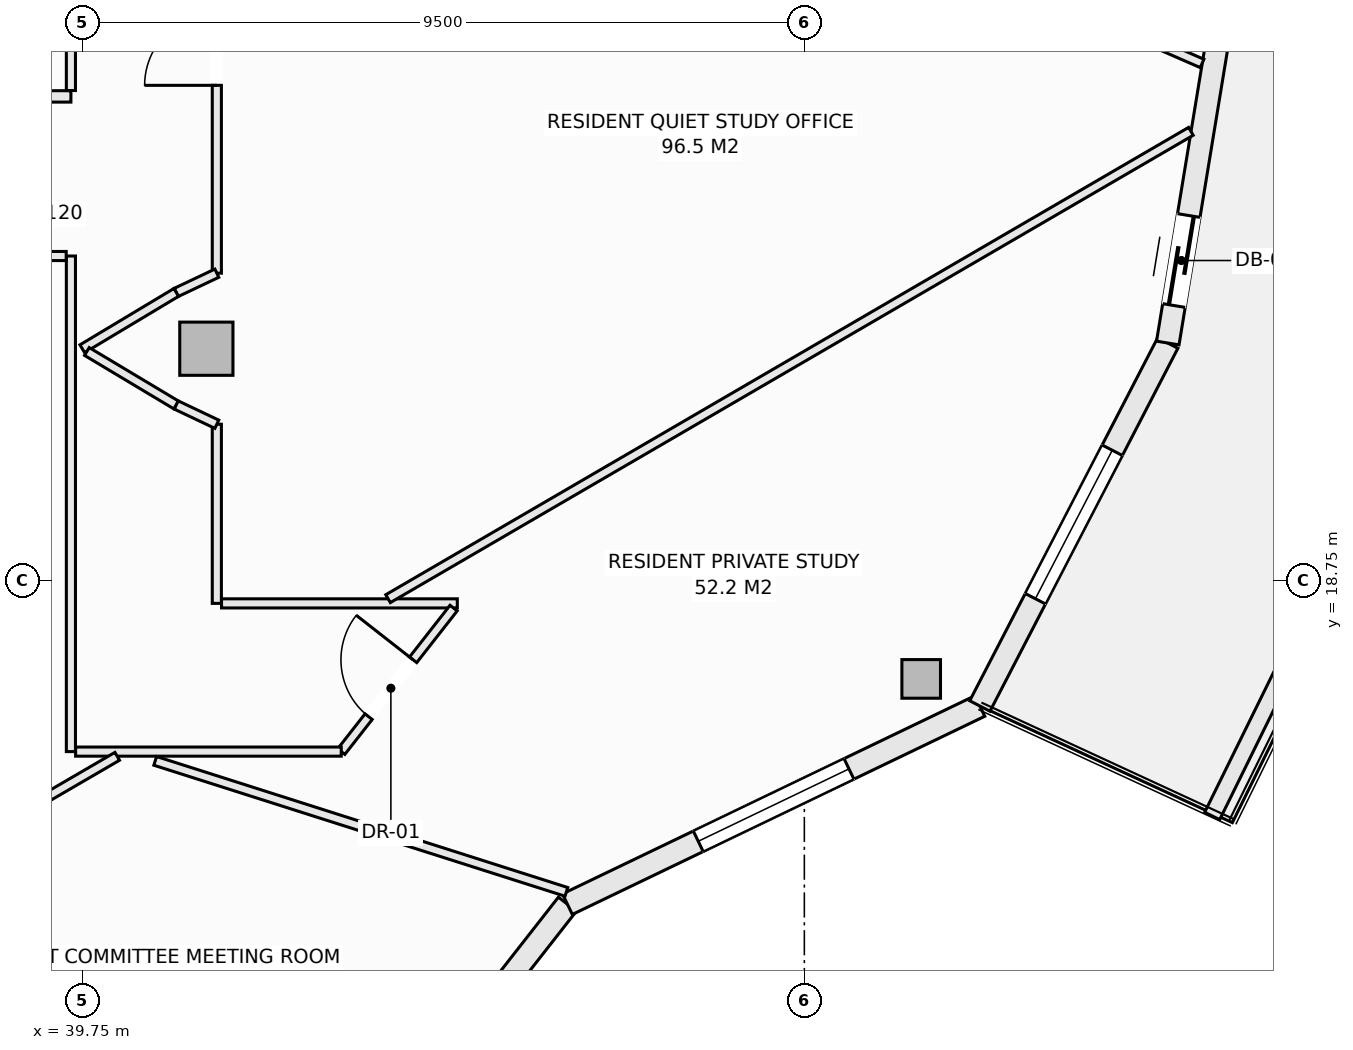
"""IFC4 building model, lengths in metres.
Left out: names, types, materials, properties, quantities, classifications, styles, units other than length and angle.
Written with IfcOpenShell. Run it as: python <this file> out.ifc"""

import sys

from ifc_helpers import new_model, si_unit, direction, frame, frame_2d, origin, origin_2d, place, context, subcontext, project, spatial, rectangle, hollow_rectangle, extrude, element, fill, save


model = new_model("IFC4")
c1 = context("Model", 3, precision=1e-05, world=origin(), true_north=direction((0.0, 1.0)))
c2 = subcontext(c1, "Body", "Model", "MODEL_VIEW")
j1 = project(units=[si_unit("LENGTHUNIT", "METRE"), si_unit("PLANEANGLEUNIT", "RADIAN")], contexts=[c1])
p1 = place(None, origin())
s1 = spatial("IfcSite", under=j1, at=p1, CompositionType="ELEMENT")
p2 = place(p1, origin())
s2 = spatial("IfcBuilding", under=s1, at=p2, CompositionType="ELEMENT")
p3 = place(p2, frame((0.0, 0.0, 229.4)))
s3 = spatial("IfcBuildingStorey", under=s2, at=p3, CompositionType="ELEMENT", Elevation=229.4)
p4 = place(p3, frame((50.787, 17.456, -0.27), z_axis=(0.0, 0.0, 1.0), x_axis=(1.0, 0.0, 0.0)))
e1 = element("IfcColumn", 1, at=p4, inside=s3, PredefinedType="COLUMN", context=c2, shape_type="SweptSolid", body=[
    extrude(hollow_rectangle(XDim=0.508, YDim=0.508, WallThickness=0.019, at=origin_2d()), origin(), (0.0, 0.0, 1.0), 3.3),
])
p5 = place(p3, frame((41.382, 21.801, -0.27), z_axis=(0.0, 0.0, 1.0), x_axis=(1.0, 0.0, 0.0)))
e2 = element("IfcColumn", 2, at=p5, inside=s3, PredefinedType="COLUMN", context=c2, shape_type="SweptSolid", body=[
    extrude(rectangle(XDim=0.7, YDim=0.7, at=origin_2d()), origin(), (0.0, 0.0, 1.0), 3.3),
])
p6 = place(p3, frame((42.5, 9.853, 0.0), z_axis=(0.0, 0.0, 1.0), x_axis=(0.616450126935, 0.787393955401, 0.0)))
e3 = element("IfcWall", 3, at=p6, inside=s3, PredefinedType="SOLIDWALL", context=c2, shape_type="SweptSolid", body=[
    extrude(rectangle(XDim=5.893, YDim=0.3, at=frame_2d((2.946, 0.0))), origin(), (0.0, 0.0, 1.0), 2.605),
])
p7 = place(p6, frame((1.846, 0.0, 0.72)))
e4 = element("IfcOpeningElement", 4, at=p7, cuts=e3, PredefinedType="OPENING", context=c2, shape_type="SweptSolid", body=[
    extrude(rectangle(XDim=2.2, YDim=1.65, at=frame_2d((1.1, 0.825))), frame((0.0, 0.16, 0.0), z_axis=(0.0, -1.0, 0.0), x_axis=(1.0, 0.0, 0.0)), (0.0, 0.0, 1.0), 0.32),
])
p8 = place(p3, frame((46.133, 14.493, 0.0), z_axis=(0.0, 0.0, 1.0), x_axis=(0.901348331142, 0.433094892545, 0.0)))
e5 = element("IfcWall", 5, at=p8, inside=s3, PredefinedType="SOLIDWALL", context=c2, shape_type="SweptSolid", body=[
    extrude(rectangle(XDim=6.021, YDim=0.3, at=frame_2d((3.01, 0.0))), origin(), (0.0, 0.0, 1.0), 2.605),
])
p9 = place(p8, frame((1.91, 0.0, 0.72)))
e6 = element("IfcOpeningElement", 6, at=p9, cuts=e5, PredefinedType="OPENING", context=c2, shape_type="SweptSolid", body=[
    extrude(rectangle(XDim=2.2, YDim=1.65, at=frame_2d((1.1, 0.825))), frame((0.0, 0.16, 0.0), z_axis=(0.0, -1.0, 0.0), x_axis=(1.0, 0.0, 0.0)), (0.0, 0.0, 1.0), 0.32),
])
p10 = place(p3, frame((51.559, 17.1, 0.0), z_axis=(0.0, 0.0, 1.0), x_axis=(0.459808219482, 0.888018243786, 0.0)))
e7 = element("IfcWall", 7, at=p10, inside=s3, PredefinedType="SOLIDWALL", context=c2, shape_type="SweptSolid", body=[
    extrude(rectangle(XDim=5.378, YDim=0.3, at=frame_2d((2.689, 0.0))), origin(), (0.0, 0.0, 1.0), 2.605),
])
p11 = place(p10, frame((1.589, 0.0, 0.72)))
e8 = element("IfcOpeningElement", 8, at=p11, cuts=e7, PredefinedType="OPENING", context=c2, shape_type="SweptSolid", body=[
    extrude(rectangle(XDim=2.2, YDim=1.65, at=frame_2d((1.1, 0.825))), frame((0.0, 0.16, 0.0), z_axis=(0.0, -1.0, 0.0), x_axis=(1.0, 0.0, 0.0)), (0.0, 0.0, 1.0), 0.32),
])
p12 = place(p3, frame((54.032, 21.875, 0.0), z_axis=(0.0, 0.0, 1.0), x_axis=(0.16237087798, 0.986729799886, 0.0)))
e9 = element("IfcWall", 9, at=p12, inside=s3, PredefinedType="SOLIDWALL", context=c2, shape_type="SweptSolid", body=[
    extrude(rectangle(XDim=5.193, YDim=0.3, at=frame_2d((2.597, 0.0))), origin(), (0.0, 0.0, 1.0), 2.605),
])
p13 = place(p12, frame((0.5, 0.0, 0.0)))
e10 = element("IfcOpeningElement", 10, at=p13, cuts=e9, PredefinedType="OPENING", context=c2, shape_type="SweptSolid", body=[
    extrude(rectangle(XDim=1.2, YDim=2.2, at=frame_2d((0.6, 1.1))), frame((0.0, 0.16, 0.0), z_axis=(0.0, -1.0, 0.0), x_axis=(1.0, 0.0, 0.0)), (0.0, 0.0, 1.0), 0.32),
])
p14 = place(p3, frame((54.616, 15.653, 0.0), z_axis=(0.0, 0.0, 1.0), x_axis=(0.441640961804, 0.897191875162, 0.0)))
e11 = element("IfcWall", 11, at=p14, inside=s3, PredefinedType="PARAPET", context=c2, shape_type="SweptSolid", body=[
    extrude(rectangle(XDim=6.178, YDim=0.22, at=frame_2d((3.089, 0.0))), origin(), (0.0, 0.0, 1.0), 0.52),
])
p15 = place(p3, frame((33.377, 25.12, 0.0), z_axis=(0.0, 0.0, 1.0), x_axis=(1.0, 0.0, 0.0)))
e12 = element("IfcWall", 12, at=p15, inside=s3, PredefinedType="PARTITIONING", context=c2, shape_type="SweptSolid", body=[
    extrude(rectangle(XDim=6.223, YDim=0.15, at=frame_2d((3.112, 0.0))), origin(), (0.0, 0.0, 1.0), 3.03),
])
p16 = place(p15, frame((2.441, 0.0, 0.0)))
e13 = element("IfcOpeningElement", 13, at=p16, cuts=e12, PredefinedType="OPENING", context=c2, shape_type="SweptSolid", body=[
    extrude(rectangle(XDim=0.95, YDim=2.1, at=frame_2d((0.475, 1.05))), frame((0.0, 0.085, 0.0), z_axis=(0.0, -1.0, 0.0), x_axis=(1.0, 0.0, 0.0)), (0.0, 0.0, 1.0), 0.17),
])
p17 = place(p3, frame((39.6, 16.5, 0.0), z_axis=(0.0, 0.0, 1.0), x_axis=(0.0, 1.0, 0.0)))
e14 = element("IfcWall", 14, at=p17, inside=s3, PredefinedType="PARTITIONING", context=c2, shape_type="SweptSolid", body=[
    extrude(rectangle(XDim=6.52, YDim=0.12, at=frame_2d((3.26, 0.0))), origin(), (0.0, 0.0, 1.0), 2.478),
])
p18 = place(p3, frame((39.6, 25.197, 0.0), z_axis=(0.0, 0.0, 1.0), x_axis=(0.0, 1.0, 0.0)))
e15 = element("IfcWall", 15, at=p18, inside=s3, PredefinedType="PARTITIONING", context=c2, shape_type="SweptSolid", body=[
    extrude(rectangle(XDim=3.646, YDim=0.12, at=frame_2d((1.823, 0.0))), origin(), (0.0, 0.0, 1.0), 3.03),
])
p19 = place(p3, frame((41.52, 18.45, 0.0), z_axis=(0.0, 0.0, 1.0), x_axis=(0.0, 1.0, 0.0)))
e16 = element("IfcWall", 16, at=p19, inside=s3, PredefinedType="PARTITIONING", context=c2, shape_type="SweptSolid", body=[
    extrude(rectangle(XDim=2.357, YDim=0.12, at=frame_2d((1.178, 0.0))), origin(), (0.0, 0.0, 1.0), 3.03),
])
p20 = place(p3, frame((41.52, 22.794, 0.0), z_axis=(0.0, 0.0, 1.0), x_axis=(0.0, 1.0, 0.0)))
e17 = element("IfcWall", 17, at=p20, inside=s3, PredefinedType="PARTITIONING", context=c2, shape_type="SweptSolid", body=[
    extrude(rectangle(XDim=8.413, YDim=0.12, at=frame_2d((4.207, 0.0))), origin(), (0.0, 0.0, 1.0), 2.478),
])
p21 = place(p20, frame((2.471, 0.0, 0.0)))
e18 = element("IfcOpeningElement", 18, at=p21, cuts=e17, PredefinedType="OPENING", context=c2, shape_type="SweptSolid", body=[
    extrude(rectangle(XDim=0.95, YDim=2.1, at=frame_2d((0.475, 1.05))), frame((0.0, 0.07, 0.0), z_axis=(0.0, -1.0, 0.0), x_axis=(1.0, 0.0, 0.0)), (0.0, 0.0, 1.0), 0.14),
])
p22 = place(p3, frame((40.986, 22.541, 0.0), z_axis=(0.0, 0.0, 1.0), x_axis=(0.903729424576, 0.428104107847, 0.0)))
e19 = element("IfcWall", 19, at=p22, inside=s3, PredefinedType="PARTITIONING", context=c2, shape_type="SweptSolid", body=[
    extrude(rectangle(XDim=0.591, YDim=0.12, at=frame_2d((0.295, 0.0))), origin(), (0.0, 0.0, 1.0), 3.03),
])
p23 = place(p3, frame((39.75, 21.8, 0.0), z_axis=(0.0, 0.0, 1.0), x_axis=(0.857702120906, 0.514146935996, 0.0)))
e20 = element("IfcWall", 20, at=p23, inside=s3, PredefinedType="PARTITIONING", context=c2, shape_type="SweptSolid", body=[
    extrude(rectangle(XDim=1.441, YDim=0.12, at=frame_2d((0.721, 0.0))), origin(), (0.0, 0.0, 1.0), 3.03),
])
p24 = place(p3, frame((39.81, 21.764, 0.0), z_axis=(0.0, 0.0, 1.0), x_axis=(0.858011245414, -0.513630901273, 0.0)))
e21 = element("IfcWall", 21, at=p24, inside=s3, PredefinedType="PARTITIONING", context=c2, shape_type="SweptSolid", body=[
    extrude(rectangle(XDim=1.37, YDim=0.12, at=frame_2d((0.685, 0.0))), origin(), (0.0, 0.0, 1.0), 3.03),
])
p25 = place(p3, frame((40.986, 21.06, 0.0), z_axis=(0.0, 0.0, 1.0), x_axis=(0.90356951601, -0.428441512621, 0.0)))
e22 = element("IfcWall", 22, at=p25, inside=s3, PredefinedType="PARTITIONING", context=c2, shape_type="SweptSolid", body=[
    extrude(rectangle(XDim=0.591, YDim=0.12, at=frame_2d((0.295, 0.0))), origin(), (0.0, 0.0, 1.0), 3.03),
])
p26 = place(p3, frame((41.582, 18.45, 0.0), z_axis=(0.0, 0.0, 1.0), x_axis=(1.0, 0.0, 0.0)))
e23 = element("IfcWall", 23, at=p26, inside=s3, PredefinedType="PARTITIONING", context=c2, shape_type="SweptSolid", body=[
    extrude(rectangle(XDim=3.102, YDim=0.12, at=frame_2d((1.551, 0.0))), origin(), (0.0, 0.0, 1.0), 3.03),
])
p27 = place(p3, frame((43.157, 16.5, 0.0), z_axis=(0.0, 0.0, 1.0), x_axis=(0.616566276607, 0.787303008092, 0.0)))
e24 = element("IfcWall", 24, at=p27, inside=s3, PredefinedType="PARTITIONING", context=c2, shape_type="SweptSolid", body=[
    extrude(rectangle(XDim=2.398, YDim=0.12, at=frame_2d((1.199, 0.0))), origin(), (0.0, 0.0, 1.0), 3.03),
])
p28 = place(p27, frame((0.584, 0.0, 0.0)))
e25 = element("IfcOpeningElement", 25, at=p28, cuts=e24, PredefinedType="OPENING", context=c2, shape_type="SweptSolid", body=[
    extrude(rectangle(XDim=0.95, YDim=2.1, at=frame_2d((0.475, 1.05))), frame((0.0, 0.07, 0.0), z_axis=(0.0, -1.0, 0.0), x_axis=(1.0, 0.0, 0.0)), (0.0, 0.0, 1.0), 0.14),
])
p29 = place(p3, frame((39.662, 16.5, 0.0), z_axis=(0.0, 0.0, 1.0), x_axis=(1.0, 0.0, 0.0)))
e26 = element("IfcWall", 26, at=p29, inside=s3, PredefinedType="PARTITIONING", context=c2, shape_type="SweptSolid", body=[
    extrude(rectangle(XDim=3.495, YDim=0.12, at=frame_2d((1.748, 0.0))), origin(), (0.0, 0.0, 1.0), 2.77),
])
p30 = place(p3, frame((39.0, 23.02, 0.0), z_axis=(0.0, 0.0, 1.0), x_axis=(1.0, 0.0, 0.0)))
e27 = element("IfcWall", 27, at=p30, inside=s3, PredefinedType="PARTITIONING", context=c2, shape_type="SweptSolid", body=[
    extrude(rectangle(XDim=0.538, YDim=0.12, at=frame_2d((0.269, 0.0))), origin(), (0.0, 0.0, 1.0), 3.03),
])
p31 = place(p3, frame((36.012, 13.995, 0.0), z_axis=(0.0, 0.0, 1.0), x_axis=(0.864278013608, 0.503014428415, 0.0)))
e28 = element("IfcWall", 28, at=p31, inside=s3, PredefinedType="PARTITIONING", context=c2, shape_type="SweptSolid", body=[
    extrude(rectangle(XDim=4.857, YDim=0.12, at=frame_2d((2.428, 0.0))), origin(), (0.0, 0.0, 1.0), 2.478),
])
p32 = place(p3, frame((43.773, 18.512, 0.0), z_axis=(0.0, 0.0, 1.0), x_axis=(0.864261022419, 0.503043621495, 0.0)))
e29 = element("IfcWall", 29, at=p32, inside=s3, PredefinedType="PARTITIONING", context=c2, shape_type="SweptSolid", body=[
    extrude(rectangle(XDim=12.222, YDim=0.12, at=frame_2d((6.111, 0.0))), origin(), (0.0, 0.0, 1.0), 3.03),
])
p33 = place(p3, frame((40.709, 16.378, 0.0), z_axis=(0.0, 0.0, 1.0), x_axis=(0.95282972489, -0.303505379469, 0.0)))
e30 = element("IfcWall", 30, at=p33, inside=s3, PredefinedType="PARTITIONING", context=c2, shape_type="SweptSolid", body=[
    extrude(rectangle(XDim=5.677, YDim=0.12, at=frame_2d((2.839, 0.0))), origin(), (0.0, 0.0, 1.0), 2.77),
])
p34 = place(p3, frame((41.582, 31.18, 0.0), z_axis=(0.0, 0.0, 1.0), x_axis=(0.916624100851, -0.399750244202, 0.0)))
e31 = element("IfcWall", 31, at=p34, inside=s3, PredefinedType="PARTITIONING", context=c2, shape_type="SweptSolid", body=[
    extrude(rectangle(XDim=14.074, YDim=0.12, at=frame_2d((7.037, 0.0))), origin(), (0.0, 0.0, 1.0), 2.478),
])
p35 = place(p9, origin())
e32 = element("IfcWindow", 32, at=p35, inside=s3, PartitioningType="SINGLE_PANEL", PredefinedType="WINDOW", context=c2, shape_type="SweptSolid", body=[
    extrude(rectangle(XDim=2.2, YDim=1.65, at=frame_2d((1.1, 0.825))), frame((0.0, 0.03, 0.0), z_axis=(0.0, -1.0, 0.0), x_axis=(1.0, 0.0, 0.0)), (0.0, 0.0, 1.0), 0.06),
])
fill(e6, e32)
p36 = place(p11, origin())
e33 = element("IfcWindow", 33, at=p36, inside=s3, PartitioningType="SINGLE_PANEL", PredefinedType="WINDOW", context=c2, shape_type="SweptSolid", body=[
    extrude(rectangle(XDim=2.2, YDim=1.65, at=frame_2d((1.1, 0.825))), frame((0.0, 0.03, 0.0), z_axis=(0.0, -1.0, 0.0), x_axis=(1.0, 0.0, 0.0)), (0.0, 0.0, 1.0), 0.06),
])
fill(e8, e33)
p37 = place(p13, frame((1.2, 0.0, 0.0), z_axis=(0.0, 0.0, 1.0), x_axis=(-1.0, 0.0, 0.0)))
e34 = element("IfcDoor", 34, at=p37, inside=s3, OperationType="SLIDING_TO_LEFT", PredefinedType="DOOR", context=c2, shape_type="SweptSolid", body=[
    extrude(rectangle(XDim=1.2, YDim=2.2, at=frame_2d((0.6, 1.1))), frame((0.0, 0.025, 0.0), z_axis=(0.0, -1.0, 0.0), x_axis=(1.0, 0.0, 0.0)), (0.0, 0.0, 1.0), 0.05),
])
fill(e10, e34)
p38 = place(p28, origin())
e35 = element("IfcDoor", 35, at=p38, inside=s3, OperationType="SINGLE_SWING_RIGHT", PredefinedType="DOOR", context=c2, shape_type="SweptSolid", body=[
    extrude(rectangle(XDim=0.95, YDim=2.1, at=frame_2d((0.475, 1.05))), frame((0.0, 0.025, 0.0), z_axis=(0.0, -1.0, 0.0), x_axis=(1.0, 0.0, 0.0)), (0.0, 0.0, 1.0), 0.05),
])
fill(e25, e35)
p39 = place(p21, origin())
e36 = element("IfcDoor", 36, at=p39, inside=s3, OperationType="SINGLE_SWING_LEFT", PredefinedType="DOOR", context=c2, shape_type="SweptSolid", body=[
    extrude(rectangle(XDim=0.95, YDim=2.1, at=frame_2d((0.475, 1.05))), frame((0.0, 0.025, 0.0), z_axis=(0.0, -1.0, 0.0), x_axis=(1.0, 0.0, 0.0)), (0.0, 0.0, 1.0), 0.05),
])
fill(e18, e36)
save(model, sys.argv[1])
